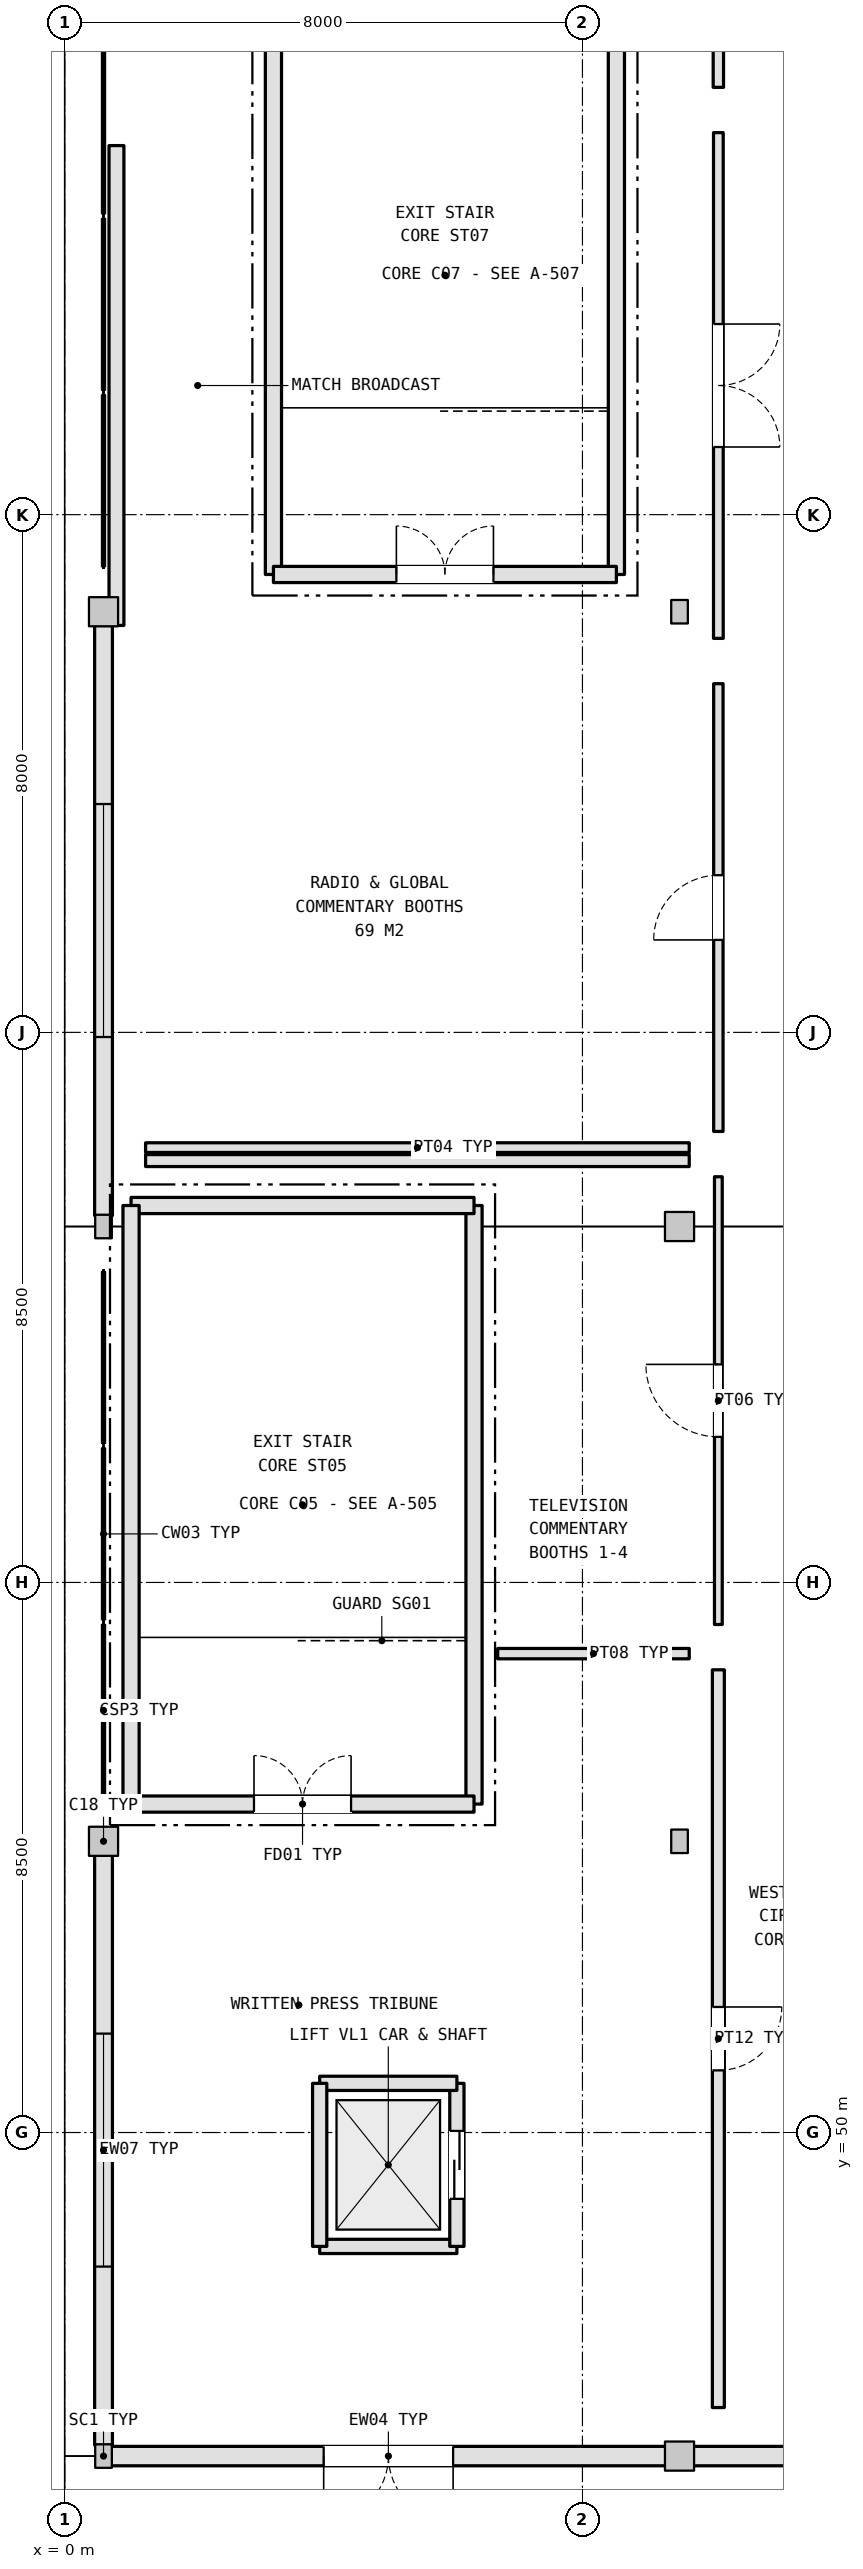
"""IFC4 building model, lengths in metres.
Left out: names, types, materials, properties, quantities, classifications, styles, units other than length and angle.
Written with IfcOpenShell. Run it as: python <this file> out.ifc"""

import sys

from ifc_helpers import new_model, si_unit, direction, frame, frame_2d, origin, origin_2d, place, context, subcontext, project, spatial, rectangle, i_section, extrude, element, fill, save


model = new_model("IFC4")
c1 = context("Model", 3, precision=1e-05, world=origin(), true_north=direction((0.0, 1.0)))
c2 = subcontext(c1, "Body", "Model", "MODEL_VIEW")
j1 = project(units=[si_unit("LENGTHUNIT", "METRE"), si_unit("PLANEANGLEUNIT", "RADIAN")], contexts=[c1])
p1 = place(None, origin())
s1 = spatial("IfcSite", under=j1, at=p1, CompositionType="ELEMENT")
p2 = place(p1, origin())
s2 = spatial("IfcBuilding", under=s1, at=p2, CompositionType="ELEMENT")
p3 = place(p2, frame((0.0, 0.0, 27.0)))
s3 = spatial("IfcBuildingStorey", under=s2, at=p3, CompositionType="ELEMENT", Elevation=27.0)
p4 = place(p3, frame((0.6, 45.0, 0.0), z_axis=(0.0, 0.0, 1.0), x_axis=(1.0, 0.0, 0.0)))
e1 = element("IfcColumn", 1, at=p4, inside=s3, PredefinedType="COLUMN", context=c2, shape_type="SweptSolid", body=[
    extrude(i_section(OverallWidth=0.257, OverallDepth=0.363, WebThickness=0.013, FlangeThickness=0.022, FilletRadius=0.015, at=origin_2d()), origin(), (0.0, 0.0, 1.0), 4.671),
])
p5 = place(p3, frame((0.6, 54.5, 0.0), z_axis=(0.0, 0.0, 1.0), x_axis=(1.0, 0.0, 0.0)))
e2 = element("IfcColumn", 2, at=p5, inside=s3, PredefinedType="COLUMN", context=c2, shape_type="SweptSolid", body=[
    extrude(rectangle(XDim=0.45, YDim=0.45, at=origin_2d()), origin(), (0.0, 0.0, 1.0), 4.671),
])
p6 = place(p3, frame((0.6, 64.0, 0.0), z_axis=(0.0, 0.0, 1.0), x_axis=(1.0, 0.0, 0.0)))
e3 = element("IfcColumn", 3, at=p6, inside=s3, PredefinedType="COLUMN", context=c2, shape_type="SweptSolid", body=[
    extrude(i_section(OverallWidth=0.257, OverallDepth=0.363, WebThickness=0.013, FlangeThickness=0.022, FilletRadius=0.015, at=origin_2d()), origin(), (0.0, 0.0, 1.0), 4.671),
])
p7 = place(p3, frame((0.6, 73.5, 0.0), z_axis=(0.0, 0.0, 1.0), x_axis=(1.0, 0.0, 0.0)))
e4 = element("IfcColumn", 4, at=p7, inside=s3, PredefinedType="COLUMN", context=c2, shape_type="SweptSolid", body=[
    extrude(rectangle(XDim=0.45, YDim=0.45, at=origin_2d()), origin(), (0.0, 0.0, 1.0), 4.671),
])
p8 = place(p3, frame((9.5, 45.0, 0.0), z_axis=(0.0, 0.0, 1.0), x_axis=(1.0, 0.0, 0.0)))
e5 = element("IfcColumn", 5, at=p8, inside=s3, PredefinedType="COLUMN", context=c2, shape_type="SweptSolid", body=[
    extrude(rectangle(XDim=0.45, YDim=0.45, at=origin_2d()), origin(), (0.0, 0.0, 1.0), 5.428),
])
p9 = place(p3, frame((9.5, 54.5, 0.0), z_axis=(0.0, 0.0, 1.0), x_axis=(1.0, 0.0, 0.0)))
e6 = element("IfcColumn", 6, at=p9, inside=s3, PredefinedType="COLUMN", context=c2, shape_type="SweptSolid", body=[
    extrude(i_section(OverallWidth=0.257, OverallDepth=0.363, WebThickness=0.013, FlangeThickness=0.022, FilletRadius=0.015, at=origin_2d()), origin(), (0.0, 0.0, 1.0), 5.428),
])
p10 = place(p3, frame((9.5, 64.0, 0.0), z_axis=(0.0, 0.0, 1.0), x_axis=(1.0, 0.0, 0.0)))
e7 = element("IfcColumn", 7, at=p10, inside=s3, PredefinedType="COLUMN", context=c2, shape_type="SweptSolid", body=[
    extrude(rectangle(XDim=0.45, YDim=0.45, at=origin_2d()), origin(), (0.0, 0.0, 1.0), 5.428),
])
p11 = place(p3, frame((9.5, 73.5, 0.0), z_axis=(0.0, 0.0, 1.0), x_axis=(1.0, 0.0, 0.0)))
e8 = element("IfcColumn", 8, at=p11, inside=s3, PredefinedType="COLUMN", context=c2, shape_type="SweptSolid", body=[
    extrude(i_section(OverallWidth=0.257, OverallDepth=0.363, WebThickness=0.013, FlangeThickness=0.022, FilletRadius=0.015, at=origin_2d()), origin(), (0.0, 0.0, 1.0), 5.428),
])
p12 = place(p3, frame((0.6, 45.169, 0.0), z_axis=(0.0, 0.0, 1.0), x_axis=(0.0, 1.0, 0.0)))
e9 = element("IfcWall", 9, at=p12, inside=s3, PredefinedType="STANDARD", context=c2, shape_type="SweptSolid", body=[
    extrude(rectangle(XDim=9.118, YDim=0.275, at=frame_2d((4.559, 0.0))), origin(), (0.0, 0.0, 1.0), 3.5),
])
p13 = place(p12, frame((2.759, 0.0, 1.05)))
e10 = element("IfcOpeningElement", 10, at=p13, cuts=e9, PredefinedType="OPENING", context=c2, shape_type="SweptSolid", body=[
    extrude(rectangle(XDim=3.6, YDim=2.0, at=frame_2d((1.8, 1.0))), frame((0.0, 0.147, 0.0), z_axis=(0.0, -1.0, 0.0), x_axis=(1.0, 0.0, 0.0)), (0.0, 0.0, 1.0), 0.295),
])
p14 = place(p3, frame((0.6, 64.169, 0.0), z_axis=(0.0, 0.0, 1.0), x_axis=(0.0, 1.0, 0.0)))
e11 = element("IfcWall", 11, at=p14, inside=s3, PredefinedType="STANDARD", context=c2, shape_type="SweptSolid", body=[
    extrude(rectangle(XDim=9.118, YDim=0.275, at=frame_2d((4.559, 0.0))), origin(), (0.0, 0.0, 1.0), 3.5),
])
p15 = place(p14, frame((2.759, 0.0, 1.05)))
e12 = element("IfcOpeningElement", 12, at=p15, cuts=e11, PredefinedType="OPENING", context=c2, shape_type="SweptSolid", body=[
    extrude(rectangle(XDim=3.6, YDim=2.0, at=frame_2d((1.8, 1.0))), frame((0.0, 0.147, 0.0), z_axis=(0.0, -1.0, 0.0), x_axis=(1.0, 0.0, 0.0)), (0.0, 0.0, 1.0), 0.295),
])
p16 = place(p3, frame((0.717, 45.0, 0.0), z_axis=(0.0, 0.0, 1.0), x_axis=(1.0, 0.0, 0.0)))
e13 = element("IfcWall", 13, at=p16, inside=s3, PredefinedType="SOLIDWALL", context=c2, shape_type="SweptSolid", body=[
    extrude(rectangle(XDim=8.571, YDim=0.3, at=frame_2d((4.285, 0.0))), origin(), (0.0, 0.0, 1.0), 3.5),
])
p17 = place(p16, frame((3.285, 0.0, 0.0)))
e14 = element("IfcOpeningElement", 14, at=p17, cuts=e13, PredefinedType="OPENING", context=c2, shape_type="SweptSolid", body=[
    extrude(rectangle(XDim=2.0, YDim=2.25, at=frame_2d((1.0, 1.125))), frame((0.0, 0.16, 0.0), z_axis=(0.0, -1.0, 0.0), x_axis=(1.0, 0.0, 0.0)), (0.0, 0.0, 1.0), 0.32),
])
p18 = place(p3, frame((9.713, 45.0, 0.0), z_axis=(0.0, 0.0, 1.0), x_axis=(1.0, 0.0, 0.0)))
e15 = element("IfcWall", 15, at=p18, inside=s3, PredefinedType="SOLIDWALL", context=c2, shape_type="SweptSolid", body=[
    extrude(rectangle(XDim=8.571, YDim=0.3, at=frame_2d((4.285, 0.0))), origin(), (0.0, 0.0, 1.0), 3.5),
])
p19 = place(p3, frame((6.325, 55.075, 0.0), z_axis=(0.0, 0.0, 1.0), x_axis=(0.0, 1.0, 0.0)))
e16 = element("IfcWall", 16, at=p19, inside=s3, PredefinedType="SHEAR", context=c2, shape_type="SweptSolid", body=[
    extrude(rectangle(XDim=9.249, YDim=0.25, at=frame_2d((4.625, 0.0))), origin(), (0.0, 0.0, 1.0), 4.62),
])
p20 = place(p3, frame((6.325, 64.325, 0.0), z_axis=(0.0, 0.0, 1.0), x_axis=(-1.0, 0.0, 0.0)))
e17 = element("IfcWall", 17, at=p20, inside=s3, PredefinedType="SHEAR", context=c2, shape_type="SweptSolid", body=[
    extrude(rectangle(XDim=5.299, YDim=0.25, at=frame_2d((2.65, 0.0))), origin(), (0.0, 0.0, 1.0), 4.62),
])
p21 = place(p3, frame((1.025, 64.325, 0.0), z_axis=(0.0, 0.0, 1.0), x_axis=(0.0, -1.0, 0.0)))
e18 = element("IfcWall", 18, at=p21, inside=s3, PredefinedType="SHEAR", context=c2, shape_type="SweptSolid", body=[
    extrude(rectangle(XDim=9.249, YDim=0.25, at=frame_2d((4.625, 0.0))), origin(), (0.0, 0.0, 1.0), 4.62),
])
p22 = place(p3, frame((1.025, 55.075, 0.0), z_axis=(0.0, 0.0, 1.0), x_axis=(1.0, 0.0, 0.0)))
e19 = element("IfcWall", 19, at=p22, inside=s3, PredefinedType="SHEAR", context=c2, shape_type="SweptSolid", body=[
    extrude(rectangle(XDim=5.299, YDim=0.25, at=frame_2d((2.65, 0.0))), origin(), (0.0, 0.0, 1.0), 4.62),
])
p23 = place(p22, frame((1.9, 0.0, 0.0)))
e20 = element("IfcOpeningElement", 20, at=p23, cuts=e19, PredefinedType="OPENING", context=c2, shape_type="SweptSolid", body=[
    extrude(rectangle(XDim=1.5, YDim=2.2, at=frame_2d((0.75, 1.1))), frame((0.0, 0.135, 0.0), z_axis=(0.0, -1.0, 0.0), x_axis=(1.0, 0.0, 0.0)), (0.0, 0.0, 1.0), 0.27),
])
for number, where, z_axis, x_axis in (
    (21, (8.525, 74.075, 0.0), (0.0, 0.0, 1.0), (0.0, 1.0, 0.0)),
    (22, (3.225, 83.325, 0.0), (0.0, 0.0, 1.0), (0.0, -1.0, 0.0)),
):
    element("IfcWall", number, at=place(p3, frame(where, z_axis=z_axis, x_axis=x_axis)), inside=s3, PredefinedType="SHEAR", context=c2, shape_type="SweptSolid", body=[
        extrude(rectangle(XDim=9.249, YDim=0.25, at=frame_2d((4.625, 0.0))), origin(), (0.0, 0.0, 1.0), 4.62),
    ])
p24 = place(p3, frame((3.225, 74.075, 0.0), z_axis=(0.0, 0.0, 1.0), x_axis=(1.0, 0.0, 0.0)))
e23 = element("IfcWall", 23, at=p24, inside=s3, PredefinedType="SHEAR", context=c2, shape_type="SweptSolid", body=[
    extrude(rectangle(XDim=5.299, YDim=0.25, at=frame_2d((2.65, 0.0))), origin(), (0.0, 0.0, 1.0), 4.62),
])
p25 = place(p24, frame((1.9, 0.0, 0.0)))
e24 = element("IfcOpeningElement", 24, at=p25, cuts=e23, PredefinedType="OPENING", context=c2, shape_type="SweptSolid", body=[
    extrude(rectangle(XDim=1.5, YDim=2.2, at=frame_2d((0.75, 1.1))), frame((0.0, 0.135, 0.0), z_axis=(0.0, -1.0, 0.0), x_axis=(1.0, 0.0, 0.0)), (0.0, 0.0, 1.0), 0.27),
])
p26 = place(p3, frame((3.94, 48.24, 0.0), z_axis=(0.0, 0.0, 1.0), x_axis=(1.0, 0.0, 0.0)))
e25 = element("IfcWall", 25, at=p26, inside=s3, PredefinedType="SHEAR", context=c2, shape_type="SweptSolid", body=[
    extrude(rectangle(XDim=2.12, YDim=0.22, at=frame_2d((1.06, 0.0))), origin(), (0.0, 0.0, 1.0), 4.62),
])
p27 = place(p3, frame((6.06, 48.24, 0.0), z_axis=(0.0, 0.0, 1.0), x_axis=(0.0, 1.0, 0.0)))
e26 = element("IfcWall", 26, at=p27, inside=s3, PredefinedType="SHEAR", context=c2, shape_type="SweptSolid", body=[
    extrude(rectangle(XDim=2.52, YDim=0.22, at=frame_2d((1.26, 0.0))), origin(), (0.0, 0.0, 1.0), 4.62),
])
p28 = place(p27, frame((0.735, 0.0, 0.0)))
e27 = element("IfcOpeningElement", 27, at=p28, cuts=e26, PredefinedType="OPENING", context=c2, shape_type="SweptSolid", body=[
    extrude(rectangle(XDim=1.05, YDim=2.15, at=frame_2d((0.525, 1.075))), frame((0.0, 0.12, 0.0), z_axis=(0.0, -1.0, 0.0), x_axis=(1.0, 0.0, 0.0)), (0.0, 0.0, 1.0), 0.24),
])
p29 = place(p3, frame((6.06, 50.76, 0.0), z_axis=(0.0, 0.0, 1.0), x_axis=(-1.0, 0.0, 0.0)))
e28 = element("IfcWall", 28, at=p29, inside=s3, PredefinedType="SHEAR", context=c2, shape_type="SweptSolid", body=[
    extrude(rectangle(XDim=2.12, YDim=0.22, at=frame_2d((1.06, 0.0))), origin(), (0.0, 0.0, 1.0), 4.62),
])
p30 = place(p3, frame((3.94, 50.76, 0.0), z_axis=(0.0, 0.0, 1.0), x_axis=(0.0, -1.0, 0.0)))
e29 = element("IfcWall", 29, at=p30, inside=s3, PredefinedType="SHEAR", context=c2, shape_type="SweptSolid", body=[
    extrude(rectangle(XDim=2.52, YDim=0.22, at=frame_2d((1.26, 0.0))), origin(), (0.0, 0.0, 1.0), 4.62),
])
p31 = place(p3, frame((10.1, 57.15, 0.0), z_axis=(0.0, 0.0, 1.0), x_axis=(0.0, -1.0, 0.0)))
e30 = element("IfcWall", 30, at=p31, inside=s3, PredefinedType="PARTITIONING", context=c2, shape_type="SweptSolid", body=[
    extrude(rectangle(XDim=11.4, YDim=0.185, at=frame_2d((5.7, 0.0))), origin(), (0.0, 0.0, 1.0), 3.5),
])
p32 = place(p31, frame((5.21, 0.0, 0.0)))
e31 = element("IfcOpeningElement", 31, at=p32, cuts=e30, PredefinedType="OPENING", context=c2, shape_type="SweptSolid", body=[
    extrude(rectangle(XDim=0.98, YDim=2.15, at=frame_2d((0.49, 1.075))), frame((0.0, 0.103, 0.0), z_axis=(0.0, -1.0, 0.0), x_axis=(1.0, 0.0, 0.0)), (0.0, 0.0, 1.0), 0.205),
])
p33 = place(p3, frame((6.69, 57.4, 0.0), z_axis=(0.0, 0.0, 1.0), x_axis=(1.0, 0.0, 0.0)))
e32 = element("IfcWall", 32, at=p33, inside=s3, PredefinedType="PARTITIONING", context=c2, shape_type="SweptSolid", body=[
    extrude(rectangle(XDim=2.96, YDim=0.16, at=frame_2d((1.48, 0.0))), origin(), (0.0, 0.0, 1.0), 3.5),
])
p34 = place(p3, frame((10.1, 64.769, 0.0), z_axis=(0.0, 0.0, 1.0), x_axis=(0.0, -1.0, 0.0)))
e33 = element("IfcWall", 33, at=p34, inside=s3, PredefinedType="PARTITIONING", context=c2, shape_type="SweptSolid", body=[
    extrude(rectangle(XDim=6.919, YDim=0.12, at=frame_2d((3.459, 0.0))), origin(), (0.0, 0.0, 1.0), 3.5),
])
p35 = place(p34, frame((2.899, 0.0, 0.0)))
e34 = element("IfcOpeningElement", 34, at=p35, cuts=e33, PredefinedType="OPENING", context=c2, shape_type="SweptSolid", body=[
    extrude(rectangle(XDim=1.12, YDim=2.2, at=frame_2d((0.56, 1.1))), frame((0.0, 0.07, 0.0), z_axis=(0.0, -1.0, 0.0), x_axis=(1.0, 0.0, 0.0)), (0.0, 0.0, 1.0), 0.14),
])
p36 = place(p3, frame((1.25, 65.019, 0.0), z_axis=(0.0, 0.0, 1.0), x_axis=(1.0, 0.0, 0.0)))
e35 = element("IfcWall", 35, at=p36, inside=s3, PredefinedType="PARTITIONING", context=c2, shape_type="SweptSolid", body=[
    extrude(rectangle(XDim=8.4, YDim=0.185, at=frame_2d((4.2, 0.0))), origin(), (0.0, 0.0, 1.0), 3.5),
])
p37 = place(p3, frame((10.1, 72.388, 0.0), z_axis=(0.0, 0.0, 1.0), x_axis=(0.0, -1.0, 0.0)))
e36 = element("IfcWall", 36, at=p37, inside=s3, PredefinedType="PARTITIONING", context=c2, shape_type="SweptSolid", body=[
    extrude(rectangle(XDim=6.919, YDim=0.145, at=frame_2d((3.459, 0.0))), origin(), (0.0, 0.0, 1.0), 3.5),
])
p38 = place(p37, frame((2.959, 0.0, 0.0)))
e37 = element("IfcOpeningElement", 37, at=p38, cuts=e36, PredefinedType="OPENING", context=c2, shape_type="SweptSolid", body=[
    extrude(rectangle(XDim=1.0, YDim=2.1, at=frame_2d((0.5, 1.05))), frame((0.0, 0.083, 0.0), z_axis=(0.0, -1.0, 0.0), x_axis=(1.0, 0.0, 0.0)), (0.0, 0.0, 1.0), 0.165),
])
p39 = place(p3, frame((9.65, 65.219, 0.0), z_axis=(0.0, 0.0, 1.0), x_axis=(-1.0, 0.0, 0.0)))
e38 = element("IfcWall", 38, at=p39, inside=s3, PredefinedType="PARTITIONING", context=c2, shape_type="SweptSolid", body=[
    extrude(rectangle(XDim=8.4, YDim=0.15, at=frame_2d((4.2, 0.0))), origin(), (0.0, 0.0, 1.0), 3.5),
])
p40 = place(p3, frame((10.1, 80.903, 0.0), z_axis=(0.0, 0.0, 1.0), x_axis=(0.0, -1.0, 0.0)))
e39 = element("IfcWall", 39, at=p40, inside=s3, PredefinedType="PARTITIONING", context=c2, shape_type="SweptSolid", body=[
    extrude(rectangle(XDim=7.815, YDim=0.15, at=frame_2d((3.908, 0.0))), origin(), (0.0, 0.0, 1.0), 3.5),
])
p41 = place(p40, frame((2.958, 0.0, 0.0)))
e40 = element("IfcOpeningElement", 40, at=p41, cuts=e39, PredefinedType="OPENING", context=c2, shape_type="SweptSolid", body=[
    extrude(rectangle(XDim=1.9, YDim=2.3, at=frame_2d((0.95, 1.15))), frame((0.0, 0.085, 0.0), z_axis=(0.0, -1.0, 0.0), x_axis=(1.0, 0.0, 0.0)), (0.0, 0.0, 1.0), 0.17),
])
p42 = place(p3, frame((0.8, 73.288, 0.0), z_axis=(0.0, 0.0, 1.0), x_axis=(0.0, 1.0, 0.0)))
e41 = element("IfcWall", 41, at=p42, inside=s3, PredefinedType="PLUMBINGWALL", context=c2, shape_type="SweptSolid", body=[
    extrude(rectangle(XDim=7.415, YDim=0.23, at=frame_2d((3.708, 0.0))), origin(), (0.0, 0.0, 1.0), 3.5),
])
p43 = place(p3, frame((10.1, 88.073, 0.0), z_axis=(0.0, 0.0, 1.0), x_axis=(0.0, -1.0, 0.0)))
e42 = element("IfcWall", 42, at=p43, inside=s3, PredefinedType="PARTITIONING", context=c2, shape_type="SweptSolid", body=[
    extrude(rectangle(XDim=6.47, YDim=0.16, at=frame_2d((3.235, 0.0))), origin(), (0.0, 0.0, 1.0), 3.5),
])
p44 = place(p43, frame((2.725, 0.0, 0.0)))
e43 = element("IfcOpeningElement", 43, at=p44, cuts=e42, PredefinedType="OPENING", context=c2, shape_type="SweptSolid", body=[
    extrude(rectangle(XDim=1.02, YDim=2.15, at=frame_2d((0.51, 1.075))), frame((0.0, 0.09, 0.0), z_axis=(0.0, -1.0, 0.0), x_axis=(1.0, 0.0, 0.0)), (0.0, 0.0, 1.0), 0.18),
])
p45 = place(p13, origin())
e44 = element("IfcWindow", 44, at=p45, inside=s3, PartitioningType="SINGLE_PANEL", PredefinedType="WINDOW", context=c2, shape_type="SweptSolid", body=[
    extrude(rectangle(XDim=3.6, YDim=2.0, at=frame_2d((1.8, 1.0))), frame((0.0, 0.03, 0.0), z_axis=(0.0, -1.0, 0.0), x_axis=(1.0, 0.0, 0.0)), (0.0, 0.0, 1.0), 0.06),
])
fill(e10, e44)
p46 = place(p15, origin())
e45 = element("IfcWindow", 45, at=p46, inside=s3, PartitioningType="SINGLE_PANEL", PredefinedType="WINDOW", context=c2, shape_type="SweptSolid", body=[
    extrude(rectangle(XDim=3.6, YDim=2.0, at=frame_2d((1.8, 1.0))), frame((0.0, 0.03, 0.0), z_axis=(0.0, -1.0, 0.0), x_axis=(1.0, 0.0, 0.0)), (0.0, 0.0, 1.0), 0.06),
])
fill(e12, e45)
p47 = place(p17, frame((2.0, 0.0, 0.0), z_axis=(0.0, 0.0, 1.0), x_axis=(-1.0, 0.0, 0.0)))
e46 = element("IfcDoor", 46, at=p47, inside=s3, OperationType="DOUBLE_DOOR_SINGLE_SWING", PredefinedType="DOOR", context=c2, shape_type="SweptSolid", body=[
    extrude(rectangle(XDim=2.0, YDim=2.25, at=frame_2d((1.0, 1.125))), frame((0.0, 0.025, 0.0), z_axis=(0.0, -1.0, 0.0), x_axis=(1.0, 0.0, 0.0)), (0.0, 0.0, 1.0), 0.05),
])
fill(e14, e46)
p48 = place(p23, origin())
e47 = element("IfcDoor", 47, at=p48, inside=s3, OperationType="DOUBLE_DOOR_SINGLE_SWING", PredefinedType="DOOR", context=c2, shape_type="SweptSolid", body=[
    extrude(rectangle(XDim=1.5, YDim=2.2, at=frame_2d((0.75, 1.1))), frame((0.0, 0.025, 0.0), z_axis=(0.0, -1.0, 0.0), x_axis=(1.0, 0.0, 0.0)), (0.0, 0.0, 1.0), 0.05),
])
fill(e20, e47)
p49 = place(p25, origin())
e48 = element("IfcDoor", 48, at=p49, inside=s3, OperationType="DOUBLE_DOOR_SINGLE_SWING", PredefinedType="DOOR", context=c2, shape_type="SweptSolid", body=[
    extrude(rectangle(XDim=1.5, YDim=2.2, at=frame_2d((0.75, 1.1))), frame((0.0, 0.025, 0.0), z_axis=(0.0, -1.0, 0.0), x_axis=(1.0, 0.0, 0.0)), (0.0, 0.0, 1.0), 0.05),
])
fill(e24, e48)
p50 = place(p28, origin())
e49 = element("IfcDoor", 49, at=p50, inside=s3, OperationType="DOUBLE_DOOR_SLIDING", PredefinedType="DOOR", context=c2, shape_type="SweptSolid", body=[
    extrude(rectangle(XDim=1.05, YDim=2.15, at=frame_2d((0.525, 1.075))), frame((0.0, 0.025, 0.0), z_axis=(0.0, -1.0, 0.0), x_axis=(1.0, 0.0, 0.0)), (0.0, 0.0, 1.0), 0.05),
])
fill(e27, e49)
p51 = place(p32, origin())
e50 = element("IfcDoor", 50, at=p51, inside=s3, OperationType="SINGLE_SWING_LEFT", PredefinedType="DOOR", context=c2, shape_type="SweptSolid", body=[
    extrude(rectangle(XDim=0.98, YDim=2.15, at=frame_2d((0.49, 1.075))), frame((0.0, 0.025, 0.0), z_axis=(0.0, -1.0, 0.0), x_axis=(1.0, 0.0, 0.0)), (0.0, 0.0, 1.0), 0.05),
])
fill(e31, e50)
p52 = place(p35, frame((1.12, 0.0, 0.0), z_axis=(0.0, 0.0, 1.0), x_axis=(-1.0, 0.0, 0.0)))
e51 = element("IfcDoor", 51, at=p52, inside=s3, OperationType="SINGLE_SWING_LEFT", PredefinedType="DOOR", context=c2, shape_type="SweptSolid", body=[
    extrude(rectangle(XDim=1.12, YDim=2.2, at=frame_2d((0.56, 1.1))), frame((0.0, 0.025, 0.0), z_axis=(0.0, -1.0, 0.0), x_axis=(1.0, 0.0, 0.0)), (0.0, 0.0, 1.0), 0.05),
])
fill(e34, e51)
p53 = place(p38, frame((1.0, 0.0, 0.0), z_axis=(0.0, 0.0, 1.0), x_axis=(-1.0, 0.0, 0.0)))
e52 = element("IfcDoor", 52, at=p53, inside=s3, OperationType="SINGLE_SWING_RIGHT", PredefinedType="DOOR", context=c2, shape_type="SweptSolid", body=[
    extrude(rectangle(XDim=1.0, YDim=2.1, at=frame_2d((0.5, 1.05))), frame((0.0, 0.025, 0.0), z_axis=(0.0, -1.0, 0.0), x_axis=(1.0, 0.0, 0.0)), (0.0, 0.0, 1.0), 0.05),
])
fill(e37, e52)
p54 = place(p41, origin())
e53 = element("IfcDoor", 53, at=p54, inside=s3, OperationType="DOUBLE_DOOR_SINGLE_SWING", PredefinedType="DOOR", context=c2, shape_type="SweptSolid", body=[
    extrude(rectangle(XDim=1.9, YDim=2.3, at=frame_2d((0.95, 1.15))), frame((0.0, 0.025, 0.0), z_axis=(0.0, -1.0, 0.0), x_axis=(1.0, 0.0, 0.0)), (0.0, 0.0, 1.0), 0.05),
])
fill(e40, e53)
save(model, sys.argv[1])
